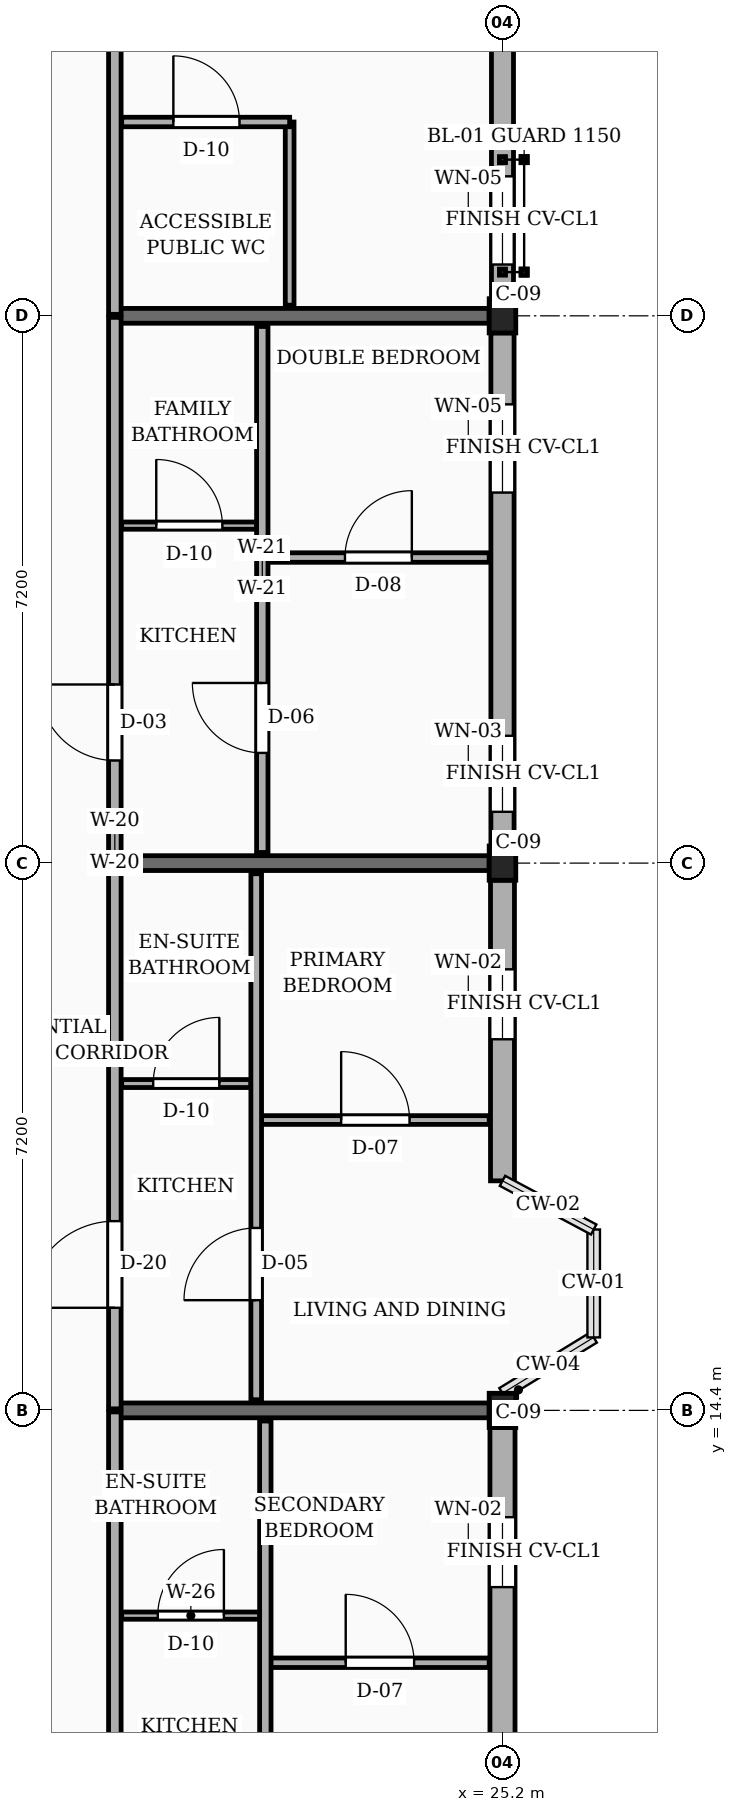
"""IFC4 building model, lengths in metres.
Left out: names, types, materials, properties, quantities, classifications, styles, units other than length and angle.
Written with IfcOpenShell. Run it as: python <this file> out.ifc"""

import sys

from ifc_helpers import new_model, si_unit, direction, frame, frame_2d, origin, origin_2d, place, context, subcontext, project, spatial, rectangle, extrude, element, fill, save


model = new_model("IFC4")
c1 = context("Model", 3, precision=1e-05, world=origin(), true_north=direction((0.0, 1.0)))
c2 = subcontext(c1, "Body", "Model", "MODEL_VIEW")
j1 = project(units=[si_unit("LENGTHUNIT", "METRE"), si_unit("PLANEANGLEUNIT", "RADIAN")], contexts=[c1])
p1 = place(None, origin())
s1 = spatial("IfcSite", under=j1, at=p1, CompositionType="ELEMENT")
p2 = place(p1, origin())
s2 = spatial("IfcBuilding", under=s1, at=p2, CompositionType="ELEMENT")
p3 = place(p2, frame((0.0, 0.0, 45.45)))
s3 = spatial("IfcBuildingStorey", under=s2, at=p3, CompositionType="ELEMENT", Elevation=45.45)
for number, where, z_axis, x_axis in (
    (1, (25.2, 14.4, 0.0), (0.0, 0.0, 1.0), (1.0, 0.0, 0.0)),
    (2, (25.2, 21.6, 0.0), (0.0, 0.0, 1.0), (1.0, 0.0, 0.0)),
    (3, (25.2, 28.8, 0.0), (0.0, 0.0, 1.0), (1.0, 0.0, 0.0)),
):
    element("IfcColumn", number, at=place(p3, frame(where, z_axis=z_axis, x_axis=x_axis)), inside=s3, PredefinedType="COLUMN", context=c2, shape_type="SweptSolid", body=[
        extrude(rectangle(XDim=0.35, YDim=0.45, at=origin_2d()), origin(), (0.0, 0.0, 1.0), 3.15),
    ])
for number, where, z_axis, x_axis in (
    (4, (20.1, 14.4, 0.0), (0.0, 0.0, 1.0), (1.0, 0.0, 0.0)),
    (5, (20.1, 21.6, 0.0), (0.0, 0.0, 1.0), (1.0, 0.0, 0.0)),
    (6, (20.1, 28.8, 0.0), (0.0, 0.0, 1.0), (1.0, 0.0, 0.0)),
):
    element("IfcWall", number, at=place(p3, frame(where, z_axis=z_axis, x_axis=x_axis)), inside=s3, PredefinedType="SOLIDWALL", context=c2, shape_type="SweptSolid", body=[
        extrude(rectangle(XDim=4.925, YDim=0.195, at=frame_2d((2.462, 0.0))), origin(), (0.0, 0.0, 1.0), 2.17),
    ])
p4 = place(p3, frame((25.2, 7.425, 0.0), z_axis=(0.0, 0.0, 1.0), x_axis=(0.0, 1.0, 0.0)))
e7 = element("IfcWall", 7, at=p4, inside=s3, PredefinedType="SOLIDWALL", context=c2, shape_type="SweptSolid", body=[
    extrude(rectangle(XDim=6.75, YDim=0.33, at=frame_2d((3.375, 0.0))), origin(), (0.0, 0.0, 1.0), 2.44),
])
p5 = place(p4, frame((0.45, 0.0, 0.78)))
e8 = element("IfcOpeningElement", 8, at=p5, cuts=e7, PredefinedType="OPENING", context=c2, shape_type="SweptSolid", body=[
    extrude(rectangle(XDim=1.45, YDim=1.44, at=frame_2d((0.725, 0.72))), frame((0.0, 0.175, 0.0), z_axis=(0.0, -1.0, 0.0), x_axis=(1.0, 0.0, 0.0)), (0.0, 0.0, 1.0), 0.35),
])
p6 = place(p4, frame((4.65, 0.0, 0.78)))
e9 = element("IfcOpeningElement", 9, at=p6, cuts=e7, PredefinedType="OPENING", context=c2, shape_type="SweptSolid", body=[
    extrude(rectangle(XDim=0.92, YDim=1.15, at=frame_2d((0.46, 0.575))), frame((0.0, 0.175, 0.0), z_axis=(0.0, -1.0, 0.0), x_axis=(1.0, 0.0, 0.0)), (0.0, 0.0, 1.0), 0.35),
])
p7 = place(p3, frame((25.2, 17.42, 0.0), z_axis=(0.0, 0.0, 1.0), x_axis=(0.0, 1.0, 0.0)))
e10 = element("IfcWall", 10, at=p7, inside=s3, PredefinedType="SOLIDWALL", context=c2, shape_type="SweptSolid", body=[
    extrude(rectangle(XDim=3.955, YDim=0.315, at=frame_2d((1.978, 0.0))), origin(), (0.0, 0.0, 1.0), 2.44),
])
p8 = place(p7, frame((1.863, 0.0, 0.78)))
e11 = element("IfcOpeningElement", 11, at=p8, cuts=e10, PredefinedType="OPENING", context=c2, shape_type="SweptSolid", body=[
    extrude(rectangle(XDim=0.92, YDim=1.15, at=frame_2d((0.46, 0.575))), frame((0.0, 0.167, 0.0), z_axis=(0.0, -1.0, 0.0), x_axis=(1.0, 0.0, 0.0)), (0.0, 0.0, 1.0), 0.335),
])
p9 = place(p3, frame((25.2, 21.825, 0.0), z_axis=(0.0, 0.0, 1.0), x_axis=(0.0, 1.0, 0.0)))
e12 = element("IfcWall", 12, at=p9, inside=s3, PredefinedType="SOLIDWALL", context=c2, shape_type="SweptSolid", body=[
    extrude(rectangle(XDim=6.75, YDim=0.305, at=frame_2d((3.375, 0.0))), origin(), (0.0, 0.0, 1.0), 2.44),
])
p10 = place(p9, frame((0.45, 0.0, 0.78)))
e13 = element("IfcOpeningElement", 13, at=p10, cuts=e12, PredefinedType="OPENING", context=c2, shape_type="SweptSolid", body=[
    extrude(rectangle(XDim=1.0, YDim=1.15, at=frame_2d((0.5, 0.575))), frame((0.0, 0.163, 0.0), z_axis=(0.0, -1.0, 0.0), x_axis=(1.0, 0.0, 0.0)), (0.0, 0.0, 1.0), 0.325),
])
p11 = place(p9, frame((4.65, 0.0, 0.78)))
e14 = element("IfcOpeningElement", 14, at=p11, cuts=e12, PredefinedType="OPENING", context=c2, shape_type="SweptSolid", body=[
    extrude(rectangle(XDim=1.16, YDim=1.15, at=frame_2d((0.58, 0.575))), frame((0.0, 0.163, 0.0), z_axis=(0.0, -1.0, 0.0), x_axis=(1.0, 0.0, 0.0)), (0.0, 0.0, 1.0), 0.325),
])
p12 = place(p3, frame((25.2, 29.025, 0.0), z_axis=(0.0, 0.0, 1.0), x_axis=(0.0, 1.0, 0.0)))
e15 = element("IfcWall", 15, at=p12, inside=s3, PredefinedType="SOLIDWALL", context=c2, shape_type="SweptSolid", body=[
    extrude(rectangle(XDim=6.75, YDim=0.29, at=frame_2d((3.375, 0.0))), origin(), (0.0, 0.0, 1.0), 2.44),
])
p13 = place(p12, frame((0.45, 0.0, 0.78)))
e16 = element("IfcOpeningElement", 16, at=p13, cuts=e15, PredefinedType="OPENING", context=c2, shape_type="SweptSolid", body=[
    extrude(rectangle(XDim=1.16, YDim=1.15, at=frame_2d((0.58, 0.575))), frame((0.0, 0.155, 0.0), z_axis=(0.0, -1.0, 0.0), x_axis=(1.0, 0.0, 0.0)), (0.0, 0.0, 1.0), 0.31),
])
p14 = place(p12, frame((4.65, 0.0, 0.78)))
e17 = element("IfcOpeningElement", 17, at=p14, cuts=e15, PredefinedType="OPENING", context=c2, shape_type="SweptSolid", body=[
    extrude(rectangle(XDim=1.32, YDim=1.15, at=frame_2d((0.66, 0.575))), frame((0.0, 0.155, 0.0), z_axis=(0.0, -1.0, 0.0), x_axis=(1.0, 0.0, 0.0)), (0.0, 0.0, 1.0), 0.31),
])
p15 = place(p3, frame((20.1, 7.375, 0.0), z_axis=(0.0, 0.0, 1.0), x_axis=(0.0, 1.0, 0.0)))
e18 = element("IfcWall", 18, at=p15, inside=s3, PredefinedType="PARTITIONING", context=c2, shape_type="SweptSolid", body=[
    extrude(rectangle(XDim=7.005, YDim=0.165, at=frame_2d((3.502, 0.0))), origin(), (0.0, 0.0, 1.0), 2.305),
])
p16 = place(p15, frame((1.175, 0.0, 0.0)))
e19 = element("IfcOpeningElement", 19, at=p16, cuts=e18, PredefinedType="OPENING", context=c2, shape_type="SweptSolid", body=[
    extrude(rectangle(XDim=0.94, YDim=2.12, at=frame_2d((0.47, 1.06))), frame((0.0, 0.093, 0.0), z_axis=(0.0, -1.0, 0.0), x_axis=(1.0, 0.0, 0.0)), (0.0, 0.0, 1.0), 0.185),
])
p17 = place(p3, frame((20.1, 14.42, 0.0), z_axis=(0.0, 0.0, 1.0), x_axis=(0.0, 1.0, 0.0)))
e20 = element("IfcWall", 20, at=p17, inside=s3, PredefinedType="PARTITIONING", context=c2, shape_type="SweptSolid", body=[
    extrude(rectangle(XDim=7.16, YDim=0.165, at=frame_2d((3.58, 0.0))), origin(), (0.0, 0.0, 1.0), 2.305),
])
p18 = place(p17, frame((1.33, 0.0, 0.0)))
e21 = element("IfcOpeningElement", 21, at=p18, cuts=e20, PredefinedType="OPENING", context=c2, shape_type="SweptSolid", body=[
    extrude(rectangle(XDim=1.14, YDim=2.18, at=frame_2d((0.57, 1.09))), frame((0.0, 0.093, 0.0), z_axis=(0.0, -1.0, 0.0), x_axis=(1.0, 0.0, 0.0)), (0.0, 0.0, 1.0), 0.185),
])
p19 = place(p3, frame((20.1, 21.62, 0.0), z_axis=(0.0, 0.0, 1.0), x_axis=(0.0, 1.0, 0.0)))
e22 = element("IfcWall", 22, at=p19, inside=s3, PredefinedType="PARTITIONING", context=c2, shape_type="SweptSolid", body=[
    extrude(rectangle(XDim=7.16, YDim=0.165, at=frame_2d((3.58, 0.0))), origin(), (0.0, 0.0, 1.0), 2.305),
])
p20 = place(p19, frame((1.33, 0.0, 0.0)))
e23 = element("IfcOpeningElement", 23, at=p20, cuts=e22, PredefinedType="OPENING", context=c2, shape_type="SweptSolid", body=[
    extrude(rectangle(XDim=1.0, YDim=2.15, at=frame_2d((0.5, 1.075))), frame((0.0, 0.093, 0.0), z_axis=(0.0, -1.0, 0.0), x_axis=(1.0, 0.0, 0.0)), (0.0, 0.0, 1.0), 0.185),
])
p21 = place(p3, frame((20.1, 28.82, 0.0), z_axis=(0.0, 0.0, 1.0), x_axis=(0.0, 1.0, 0.0)))
e24 = element("IfcWall", 24, at=p21, inside=s3, PredefinedType="PARTITIONING", context=c2, shape_type="SweptSolid", body=[
    extrude(rectangle(XDim=7.005, YDim=0.165, at=frame_2d((3.502, 0.0))), origin(), (0.0, 0.0, 1.0), 2.305),
])
p22 = place(p21, frame((4.33, 0.0, 0.0)))
e25 = element("IfcOpeningElement", 25, at=p22, cuts=e24, PredefinedType="OPENING", context=c2, shape_type="SweptSolid", body=[
    extrude(rectangle(XDim=1.1, YDim=2.15, at=frame_2d((0.55, 1.075))), frame((0.0, 0.093, 0.0), z_axis=(0.0, -1.0, 0.0), x_axis=(1.0, 0.0, 0.0)), (0.0, 0.0, 1.0), 0.185),
])
p23 = place(p3, frame((22.15, 11.08, 0.0), z_axis=(0.0, 0.0, 1.0), x_axis=(1.0, 0.0, 0.0)))
e26 = element("IfcWall", 26, at=p23, inside=s3, PredefinedType="PARTITIONING", context=c2, shape_type="SweptSolid", body=[
    extrude(rectangle(XDim=2.875, YDim=0.125, at=frame_2d((1.438, 0.0))), origin(), (0.0, 0.0, 1.0), 2.305),
])
p24 = place(p23, frame((0.988, 0.0, 0.0)))
e27 = element("IfcOpeningElement", 27, at=p24, cuts=e26, PredefinedType="OPENING", context=c2, shape_type="SweptSolid", body=[
    extrude(rectangle(XDim=0.9, YDim=2.1, at=frame_2d((0.45, 1.05))), frame((0.0, 0.073, 0.0), z_axis=(0.0, -1.0, 0.0), x_axis=(1.0, 0.0, 0.0)), (0.0, 0.0, 1.0), 0.145),
])
p25 = place(p3, frame((20.19, 11.7, 0.0), z_axis=(0.0, 0.0, 1.0), x_axis=(1.0, 0.0, 0.0)))
e28 = element("IfcWall", 28, at=p25, inside=s3, PredefinedType="PARTITIONING", context=c2, shape_type="SweptSolid", body=[
    extrude(rectangle(XDim=1.82, YDim=0.095, at=frame_2d((0.91, 0.0))), origin(), (0.0, 0.0, 1.0), 2.305),
])
p26 = place(p25, frame((0.475, 0.0, 0.0)))
e29 = element("IfcOpeningElement", 29, at=p26, cuts=e28, PredefinedType="OPENING", context=c2, shape_type="SweptSolid", body=[
    extrude(rectangle(XDim=0.87, YDim=2.05, at=frame_2d((0.435, 1.025))), frame((0.0, 0.058, 0.0), z_axis=(0.0, -1.0, 0.0), x_axis=(1.0, 0.0, 0.0)), (0.0, 0.0, 1.0), 0.115),
])
p27 = place(p3, frame((22.08, 7.375, 0.0), z_axis=(0.0, 0.0, 1.0), x_axis=(0.0, 1.0, 0.0)))
e30 = element("IfcWall", 30, at=p27, inside=s3, PredefinedType="PARTITIONING", context=c2, shape_type="SweptSolid", body=[
    extrude(rectangle(XDim=6.885, YDim=0.15, at=frame_2d((3.442, 0.0))), origin(), (0.0, 0.0, 1.0), 2.305),
])
p28 = place(p27, frame((1.275, 0.0, 0.0)))
e31 = element("IfcOpeningElement", 31, at=p28, cuts=e30, PredefinedType="OPENING", context=c2, shape_type="SweptSolid", body=[
    extrude(rectangle(XDim=0.95, YDim=2.1, at=frame_2d((0.475, 1.05))), frame((0.0, 0.085, 0.0), z_axis=(0.0, -1.0, 0.0), x_axis=(1.0, 0.0, 0.0)), (0.0, 0.0, 1.0), 0.17),
])
p29 = place(p3, frame((22.03, 18.22, 0.0), z_axis=(0.0, 0.0, 1.0), x_axis=(1.0, 0.0, 0.0)))
e32 = element("IfcWall", 32, at=p29, inside=s3, PredefinedType="PARTITIONING", context=c2, shape_type="SweptSolid", body=[
    extrude(rectangle(XDim=2.995, YDim=0.115, at=frame_2d((1.498, 0.0))), origin(), (0.0, 0.0, 1.0), 2.305),
])
p30 = place(p29, frame((1.048, 0.0, 0.0)))
e33 = element("IfcOpeningElement", 33, at=p30, cuts=e32, PredefinedType="OPENING", context=c2, shape_type="SweptSolid", body=[
    extrude(rectangle(XDim=0.9, YDim=2.1, at=frame_2d((0.45, 1.05))), frame((0.0, 0.067, 0.0), z_axis=(0.0, -1.0, 0.0), x_axis=(1.0, 0.0, 0.0)), (0.0, 0.0, 1.0), 0.135),
])
p31 = place(p3, frame((20.19, 18.7, 0.0), z_axis=(0.0, 0.0, 1.0), x_axis=(1.0, 0.0, 0.0)))
e34 = element("IfcWall", 34, at=p31, inside=s3, PredefinedType="PARTITIONING", context=c2, shape_type="SweptSolid", body=[
    extrude(rectangle(XDim=1.7, YDim=0.105, at=frame_2d((0.85, 0.0))), origin(), (0.0, 0.0, 1.0), 2.305),
])
p32 = place(p31, frame((0.415, 0.0, 0.0)))
e35 = element("IfcOpeningElement", 35, at=p32, cuts=e34, PredefinedType="OPENING", context=c2, shape_type="SweptSolid", body=[
    extrude(rectangle(XDim=0.87, YDim=2.05, at=frame_2d((0.435, 1.025))), frame((0.0, 0.062, 0.0), z_axis=(0.0, -1.0, 0.0), x_axis=(1.0, 0.0, 0.0)), (0.0, 0.0, 1.0), 0.125),
])
p33 = place(p3, frame((21.96, 14.54, 0.0), z_axis=(0.0, 0.0, 1.0), x_axis=(0.0, 1.0, 0.0)))
e36 = element("IfcWall", 36, at=p33, inside=s3, PredefinedType="PARTITIONING", context=c2, shape_type="SweptSolid", body=[
    extrude(rectangle(XDim=6.92, YDim=0.14, at=frame_2d((3.46, 0.0))), origin(), (0.0, 0.0, 1.0), 2.305),
])
p34 = place(p33, frame((1.31, 0.0, 0.0)))
e37 = element("IfcOpeningElement", 37, at=p34, cuts=e36, PredefinedType="OPENING", context=c2, shape_type="SweptSolid", body=[
    extrude(rectangle(XDim=0.95, YDim=2.1, at=frame_2d((0.475, 1.05))), frame((0.0, 0.08, 0.0), z_axis=(0.0, -1.0, 0.0), x_axis=(1.0, 0.0, 0.0)), (0.0, 0.0, 1.0), 0.16),
])
p35 = place(p3, frame((22.11, 25.62, 0.0), z_axis=(0.0, 0.0, 1.0), x_axis=(1.0, 0.0, 0.0)))
e38 = element("IfcWall", 38, at=p35, inside=s3, PredefinedType="PARTITIONING", context=c2, shape_type="SweptSolid", body=[
    extrude(rectangle(XDim=2.915, YDim=0.125, at=frame_2d((1.458, 0.0))), origin(), (0.0, 0.0, 1.0), 2.305),
])
p36 = place(p35, frame((1.018, 0.0, 0.0)))
e39 = element("IfcOpeningElement", 39, at=p36, cuts=e38, PredefinedType="OPENING", context=c2, shape_type="SweptSolid", body=[
    extrude(rectangle(XDim=0.88, YDim=2.08, at=frame_2d((0.44, 1.04))), frame((0.0, 0.073, 0.0), z_axis=(0.0, -1.0, 0.0), x_axis=(1.0, 0.0, 0.0)), (0.0, 0.0, 1.0), 0.145),
])
p37 = place(p3, frame((20.19, 26.04, 0.0), z_axis=(0.0, 0.0, 1.0), x_axis=(1.0, 0.0, 0.0)))
e40 = element("IfcWall", 40, at=p37, inside=s3, PredefinedType="PARTITIONING", context=c2, shape_type="SweptSolid", body=[
    extrude(rectangle(XDim=1.78, YDim=0.095, at=frame_2d((0.89, 0.0))), origin(), (0.0, 0.0, 1.0), 2.305),
])
p38 = place(p37, frame((0.455, 0.0, 0.0)))
e41 = element("IfcOpeningElement", 41, at=p38, cuts=e40, PredefinedType="OPENING", context=c2, shape_type="SweptSolid", body=[
    extrude(rectangle(XDim=0.87, YDim=2.05, at=frame_2d((0.435, 1.025))), frame((0.0, 0.058, 0.0), z_axis=(0.0, -1.0, 0.0), x_axis=(1.0, 0.0, 0.0)), (0.0, 0.0, 1.0), 0.115),
])
p39 = place(p3, frame((22.04, 21.74, 0.0), z_axis=(0.0, 0.0, 1.0), x_axis=(0.0, 1.0, 0.0)))
e42 = element("IfcWall", 42, at=p39, inside=s3, PredefinedType="PARTITIONING", context=c2, shape_type="SweptSolid", body=[
    extrude(rectangle(XDim=6.92, YDim=0.15, at=frame_2d((3.46, 0.0))), origin(), (0.0, 0.0, 1.0), 2.305),
])
p40 = place(p39, frame((1.31, 0.0, 0.0)))
e43 = element("IfcOpeningElement", 43, at=p40, cuts=e42, PredefinedType="OPENING", context=c2, shape_type="SweptSolid", body=[
    extrude(rectangle(XDim=0.92, YDim=2.1, at=frame_2d((0.46, 1.05))), frame((0.0, 0.085, 0.0), z_axis=(0.0, -1.0, 0.0), x_axis=(1.0, 0.0, 0.0)), (0.0, 0.0, 1.0), 0.17),
])
p41 = place(p3, frame((22.4, 28.94, 0.0), z_axis=(0.0, 0.0, 1.0), x_axis=(0.0, 1.0, 0.0)))
e44 = element("IfcWall", 44, at=p41, inside=s3, PredefinedType="PARTITIONING", context=c2, shape_type="SweptSolid", body=[
    extrude(rectangle(XDim=2.41, YDim=0.115, at=frame_2d((1.205, 0.0))), origin(), (0.0, 0.0, 1.0), 2.305),
])
p42 = place(p3, frame((20.19, 31.35, 0.0), z_axis=(0.0, 0.0, 1.0), x_axis=(1.0, 0.0, 0.0)))
e45 = element("IfcWall", 45, at=p42, inside=s3, PredefinedType="PARTITIONING", context=c2, shape_type="SweptSolid", body=[
    extrude(rectangle(XDim=2.21, YDim=0.125, at=frame_2d((1.105, 0.0))), origin(), (0.0, 0.0, 1.0), 2.305),
])
p43 = place(p42, frame((0.68, 0.0, 0.0)))
e46 = element("IfcOpeningElement", 46, at=p43, cuts=e45, PredefinedType="OPENING", context=c2, shape_type="SweptSolid", body=[
    extrude(rectangle(XDim=0.87, YDim=2.05, at=frame_2d((0.435, 1.025))), frame((0.0, 0.073, 0.0), z_axis=(0.0, -1.0, 0.0), x_axis=(1.0, 0.0, 0.0)), (0.0, 0.0, 1.0), 0.145),
])
p44 = place(p6, origin())
e47 = element("IfcWindow", 47, at=p44, inside=s3, PartitioningType="SINGLE_PANEL", PredefinedType="WINDOW", context=c2, shape_type="SweptSolid", body=[
    extrude(rectangle(XDim=0.92, YDim=1.15, at=frame_2d((0.46, 0.575))), frame((0.0, 0.03, 0.0), z_axis=(0.0, -1.0, 0.0), x_axis=(1.0, 0.0, 0.0)), (0.0, 0.0, 1.0), 0.06),
])
fill(e9, e47)
p45 = place(p8, origin())
e48 = element("IfcWindow", 48, at=p45, inside=s3, PartitioningType="SINGLE_PANEL", PredefinedType="WINDOW", context=c2, shape_type="SweptSolid", body=[
    extrude(rectangle(XDim=0.92, YDim=1.15, at=frame_2d((0.46, 0.575))), frame((0.0, 0.03, 0.0), z_axis=(0.0, -1.0, 0.0), x_axis=(1.0, 0.0, 0.0)), (0.0, 0.0, 1.0), 0.06),
])
fill(e11, e48)
p46 = place(p10, origin())
e49 = element("IfcWindow", 49, at=p46, inside=s3, PartitioningType="SINGLE_PANEL", PredefinedType="WINDOW", context=c2, shape_type="SweptSolid", body=[
    extrude(rectangle(XDim=1.0, YDim=1.15, at=frame_2d((0.5, 0.575))), frame((0.0, 0.03, 0.0), z_axis=(0.0, -1.0, 0.0), x_axis=(1.0, 0.0, 0.0)), (0.0, 0.0, 1.0), 0.06),
])
fill(e13, e49)
p47 = place(p11, origin())
e50 = element("IfcWindow", 50, at=p47, inside=s3, PartitioningType="SINGLE_PANEL", PredefinedType="WINDOW", context=c2, shape_type="SweptSolid", body=[
    extrude(rectangle(XDim=1.16, YDim=1.15, at=frame_2d((0.58, 0.575))), frame((0.0, 0.03, 0.0), z_axis=(0.0, -1.0, 0.0), x_axis=(1.0, 0.0, 0.0)), (0.0, 0.0, 1.0), 0.06),
])
fill(e14, e50)
p48 = place(p13, origin())
e51 = element("IfcWindow", 51, at=p48, inside=s3, PartitioningType="SINGLE_PANEL", PredefinedType="WINDOW", context=c2, shape_type="SweptSolid", body=[
    extrude(rectangle(XDim=1.16, YDim=1.15, at=frame_2d((0.58, 0.575))), frame((0.0, 0.03, 0.0), z_axis=(0.0, -1.0, 0.0), x_axis=(1.0, 0.0, 0.0)), (0.0, 0.0, 1.0), 0.06),
])
fill(e16, e51)
p49 = place(p18, origin())
e52 = element("IfcDoor", 52, at=p49, inside=s3, OperationType="SINGLE_SWING_LEFT", PredefinedType="DOOR", context=c2, shape_type="SweptSolid", body=[
    extrude(rectangle(XDim=1.14, YDim=2.18, at=frame_2d((0.57, 1.09))), frame((0.0, 0.025, 0.0), z_axis=(0.0, -1.0, 0.0), x_axis=(1.0, 0.0, 0.0)), (0.0, 0.0, 1.0), 0.05),
])
fill(e21, e52)
p50 = place(p20, origin())
e53 = element("IfcDoor", 53, at=p50, inside=s3, OperationType="SINGLE_SWING_RIGHT", PredefinedType="DOOR", context=c2, shape_type="SweptSolid", body=[
    extrude(rectangle(XDim=1.0, YDim=2.15, at=frame_2d((0.5, 1.075))), frame((0.0, 0.025, 0.0), z_axis=(0.0, -1.0, 0.0), x_axis=(1.0, 0.0, 0.0)), (0.0, 0.0, 1.0), 0.05),
])
fill(e23, e53)
p51 = place(p24, origin())
e54 = element("IfcDoor", 54, at=p51, inside=s3, OperationType="SINGLE_SWING_LEFT", PredefinedType="DOOR", context=c2, shape_type="SweptSolid", body=[
    extrude(rectangle(XDim=0.9, YDim=2.1, at=frame_2d((0.45, 1.05))), frame((0.0, 0.025, 0.0), z_axis=(0.0, -1.0, 0.0), x_axis=(1.0, 0.0, 0.0)), (0.0, 0.0, 1.0), 0.05),
])
fill(e27, e54)
p52 = place(p26, origin())
e55 = element("IfcDoor", 55, at=p52, inside=s3, OperationType="SINGLE_SWING_RIGHT", PredefinedType="DOOR", context=c2, shape_type="SweptSolid", body=[
    extrude(rectangle(XDim=0.87, YDim=2.05, at=frame_2d((0.435, 1.025))), frame((0.0, 0.025, 0.0), z_axis=(0.0, -1.0, 0.0), x_axis=(1.0, 0.0, 0.0)), (0.0, 0.0, 1.0), 0.05),
])
fill(e29, e55)
p53 = place(p30, origin())
e56 = element("IfcDoor", 56, at=p53, inside=s3, OperationType="SINGLE_SWING_LEFT", PredefinedType="DOOR", context=c2, shape_type="SweptSolid", body=[
    extrude(rectangle(XDim=0.9, YDim=2.1, at=frame_2d((0.45, 1.05))), frame((0.0, 0.025, 0.0), z_axis=(0.0, -1.0, 0.0), x_axis=(1.0, 0.0, 0.0)), (0.0, 0.0, 1.0), 0.05),
])
fill(e33, e56)
p54 = place(p32, origin())
e57 = element("IfcDoor", 57, at=p54, inside=s3, OperationType="SINGLE_SWING_RIGHT", PredefinedType="DOOR", context=c2, shape_type="SweptSolid", body=[
    extrude(rectangle(XDim=0.87, YDim=2.05, at=frame_2d((0.435, 1.025))), frame((0.0, 0.025, 0.0), z_axis=(0.0, -1.0, 0.0), x_axis=(1.0, 0.0, 0.0)), (0.0, 0.0, 1.0), 0.05),
])
fill(e35, e57)
p55 = place(p34, origin())
e58 = element("IfcDoor", 58, at=p55, inside=s3, OperationType="SINGLE_SWING_LEFT", PredefinedType="DOOR", context=c2, shape_type="SweptSolid", body=[
    extrude(rectangle(XDim=0.95, YDim=2.1, at=frame_2d((0.475, 1.05))), frame((0.0, 0.025, 0.0), z_axis=(0.0, -1.0, 0.0), x_axis=(1.0, 0.0, 0.0)), (0.0, 0.0, 1.0), 0.05),
])
fill(e37, e58)
p56 = place(p36, origin())
e59 = element("IfcDoor", 59, at=p56, inside=s3, OperationType="SINGLE_SWING_RIGHT", PredefinedType="DOOR", context=c2, shape_type="SweptSolid", body=[
    extrude(rectangle(XDim=0.88, YDim=2.08, at=frame_2d((0.44, 1.04))), frame((0.0, 0.025, 0.0), z_axis=(0.0, -1.0, 0.0), x_axis=(1.0, 0.0, 0.0)), (0.0, 0.0, 1.0), 0.05),
])
fill(e39, e59)
p57 = place(p38, origin())
e60 = element("IfcDoor", 60, at=p57, inside=s3, OperationType="SINGLE_SWING_LEFT", PredefinedType="DOOR", context=c2, shape_type="SweptSolid", body=[
    extrude(rectangle(XDim=0.87, YDim=2.05, at=frame_2d((0.435, 1.025))), frame((0.0, 0.025, 0.0), z_axis=(0.0, -1.0, 0.0), x_axis=(1.0, 0.0, 0.0)), (0.0, 0.0, 1.0), 0.05),
])
fill(e41, e60)
p58 = place(p40, origin())
e61 = element("IfcDoor", 61, at=p58, inside=s3, OperationType="SINGLE_SWING_RIGHT", PredefinedType="DOOR", context=c2, shape_type="SweptSolid", body=[
    extrude(rectangle(XDim=0.92, YDim=2.1, at=frame_2d((0.46, 1.05))), frame((0.0, 0.025, 0.0), z_axis=(0.0, -1.0, 0.0), x_axis=(1.0, 0.0, 0.0)), (0.0, 0.0, 1.0), 0.05),
])
fill(e43, e61)
p59 = place(p43, origin())
e62 = element("IfcDoor", 62, at=p59, inside=s3, OperationType="SINGLE_SWING_LEFT", PredefinedType="DOOR", context=c2, shape_type="SweptSolid", body=[
    extrude(rectangle(XDim=0.87, YDim=2.05, at=frame_2d((0.435, 1.025))), frame((0.0, 0.025, 0.0), z_axis=(0.0, -1.0, 0.0), x_axis=(1.0, 0.0, 0.0)), (0.0, 0.0, 1.0), 0.05),
])
fill(e46, e62)
save(model, sys.argv[1])
